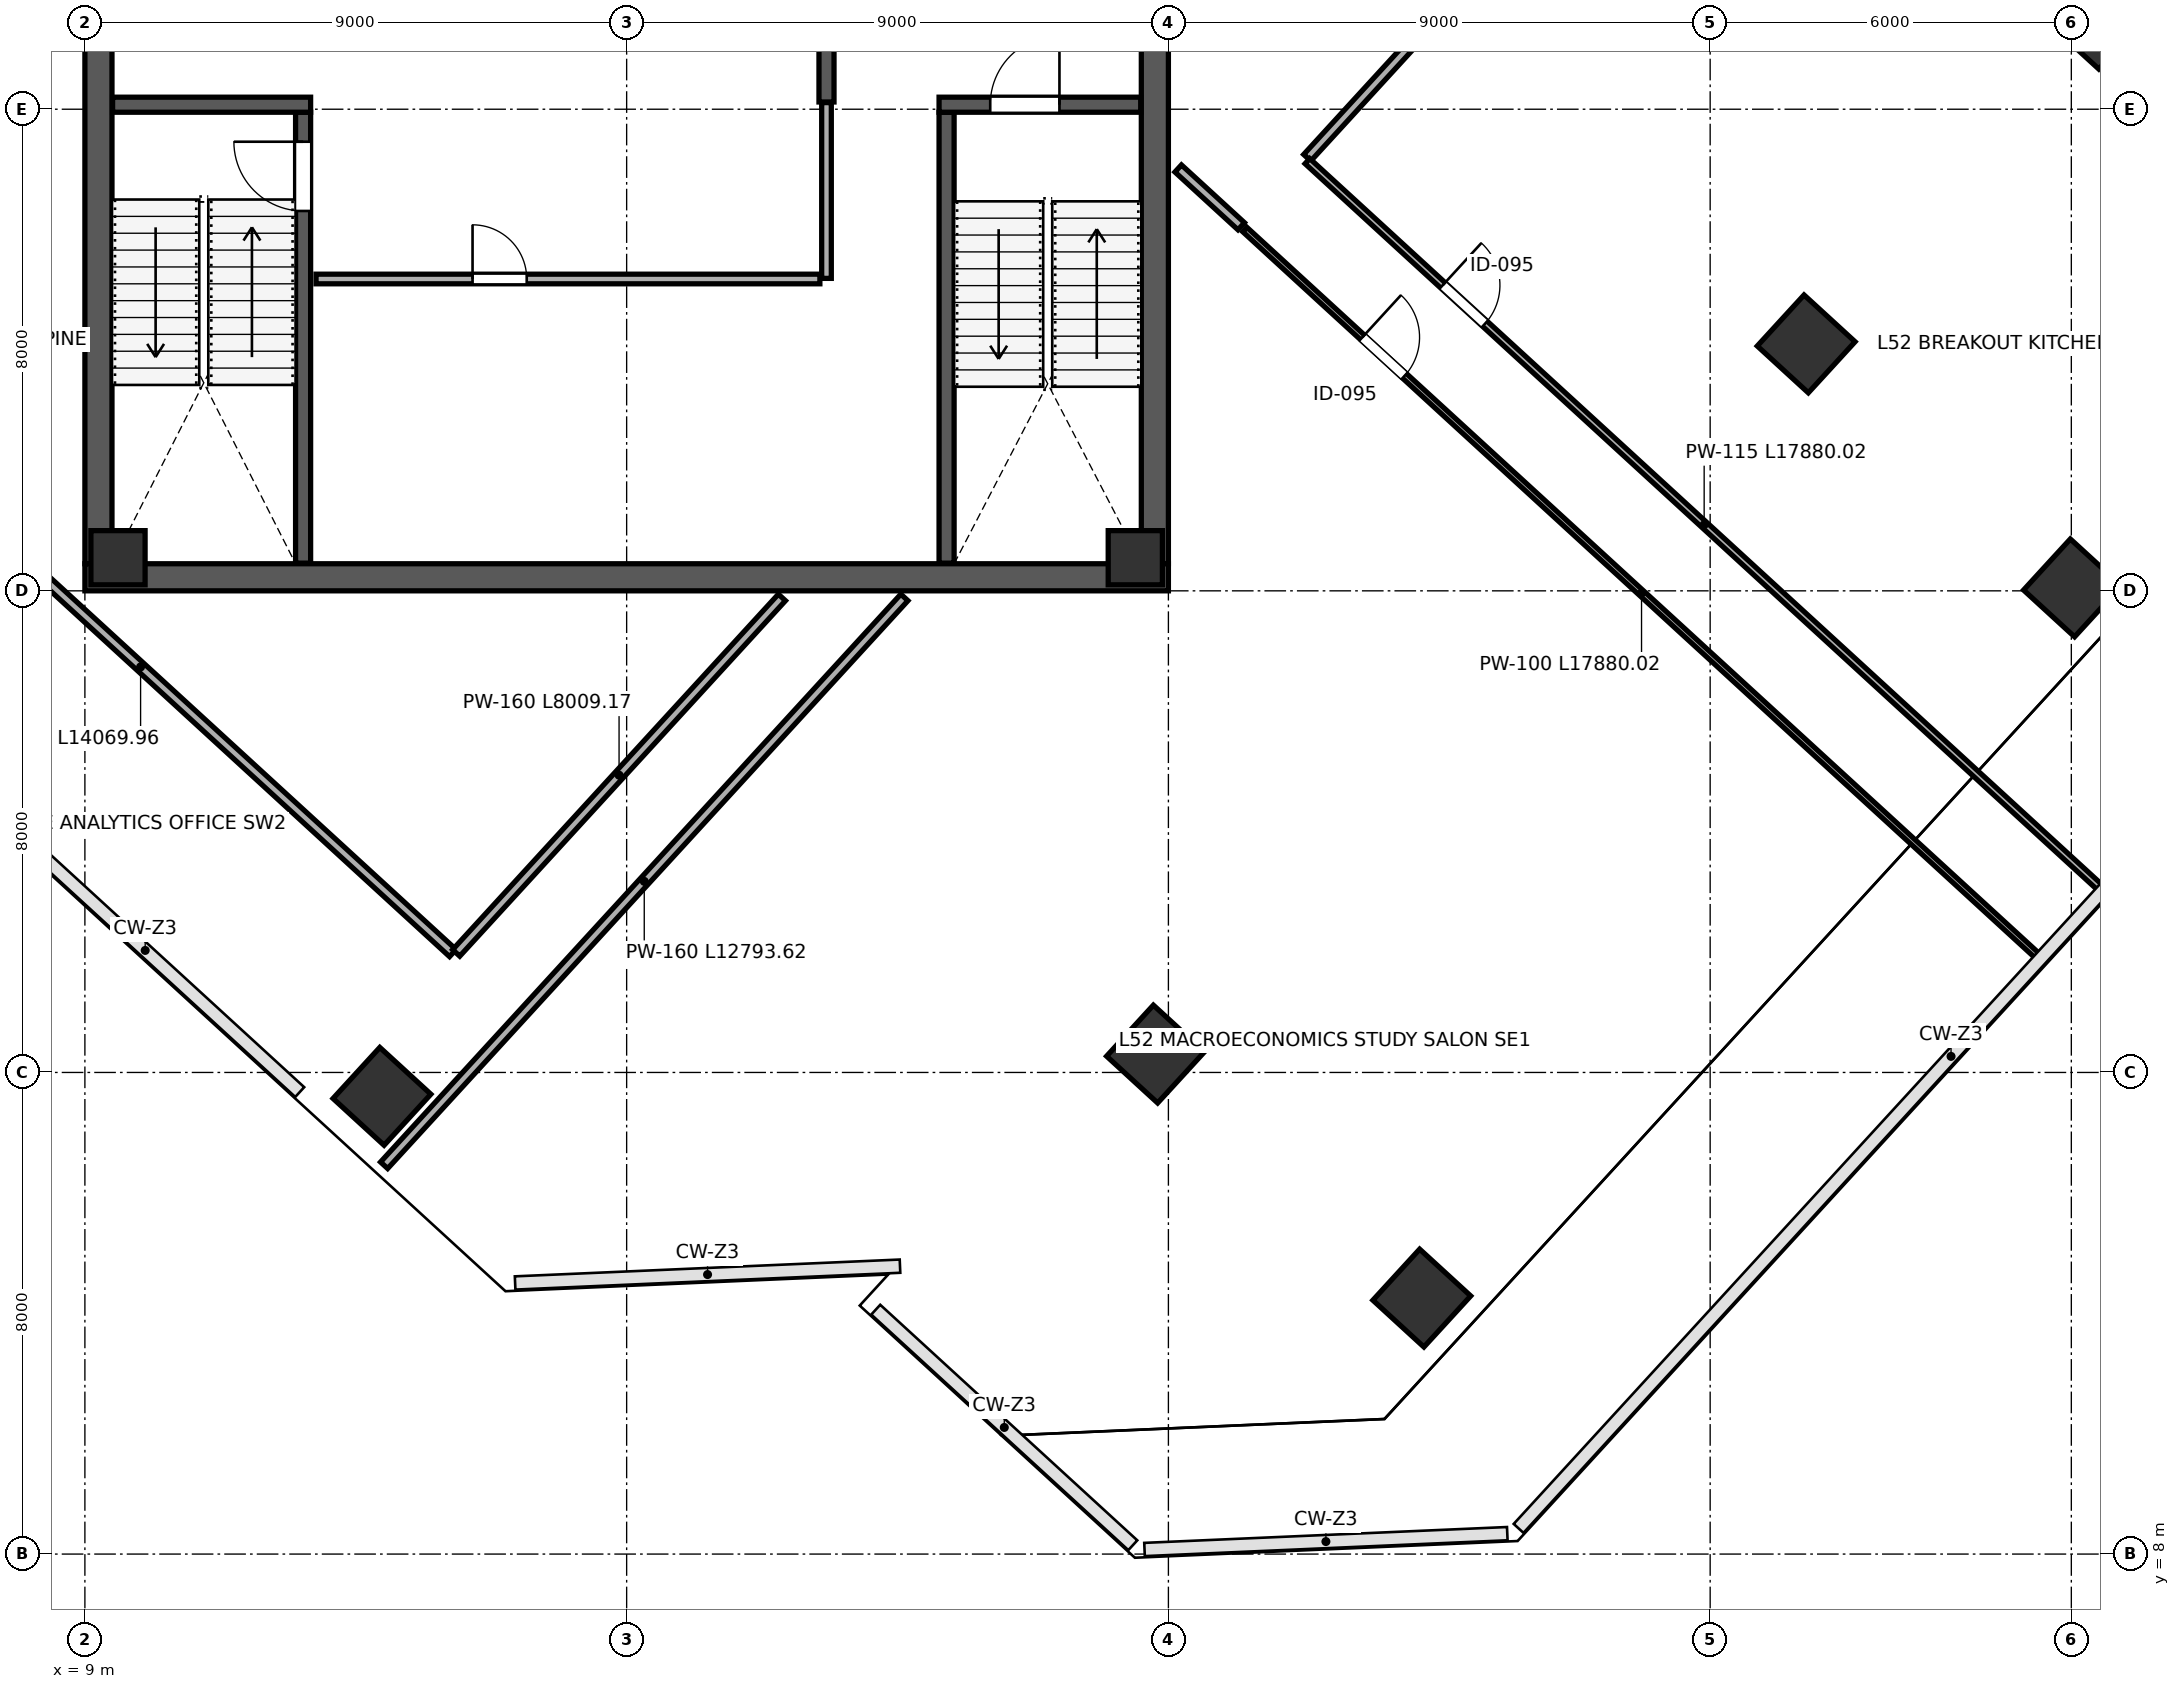
"""IFC4 building model, lengths in metres.
Left out: names, types, materials, properties, quantities, classifications, styles, units other than length and angle.
Written with IfcOpenShell. Run it as: python <this file> out.ifc"""

import sys

from ifc_helpers import new_model, si_unit, direction, frame, frame_2d, origin, origin_2d, place, context, subcontext, project, spatial, rectangle, extrude, source, transform, mapped, element, fill, save


model = new_model("IFC4")
c1 = context("Model", 3, precision=1e-05, world=origin(), true_north=direction((0.0, 1.0)))
c2 = subcontext(c1, "Body", "Model", "MODEL_VIEW")
j1 = project(units=[si_unit("LENGTHUNIT", "METRE"), si_unit("PLANEANGLEUNIT", "RADIAN")], contexts=[c1])
p1 = place(None, origin())
s1 = spatial("IfcSite", under=j1, at=p1, CompositionType="ELEMENT")
p2 = place(p1, origin())
s2 = spatial("IfcBuilding", under=s1, at=p2, CompositionType="ELEMENT")
p3 = place(p2, frame((0.0, 0.0, 233.2)))
s3 = spatial("IfcBuildingStorey", under=s2, at=p3, CompositionType="ELEMENT", Elevation=233.2)
m1 = source(origin(), c2, "Body", "SweptSolid", [
    extrude(rectangle(XDim=0.9, YDim=0.9, at=origin_2d()), origin(), (0.0, 0.0, 1.0), 4.198),
])
for number, where, z_axis, x_axis in (
    (1, (9.55, 24.55, 0.001), (0.0, 0.0, 1.0), (1.0, 0.0, 0.0)),
    (2, (26.45, 24.55, 0.001), (0.0, 0.0, 1.0), (1.0, 0.0, 0.0)),
):
    element("IfcColumn", number, at=place(p3, frame(where, z_axis=z_axis, x_axis=x_axis)), inside=s3, PredefinedType="COLUMN", context=c2, shape_type="MappedRepresentation", body=[
        mapped(m1, transform((0.0, 0.0, 0.0), scale=1.0)),
    ])
m2 = source(origin(), c2, "Body", "SweptSolid", [
    extrude(rectangle(XDim=1.15, YDim=1.15, at=origin_2d()), origin(), (0.0, 0.0, 1.0), 4.198),
])
p4 = place(p3, frame((13.935, 15.603, 0.001), z_axis=(0.0, 0.0, 1.0), x_axis=(-0.73727733681, 0.675590207616, 0.0)))
e3 = element("IfcColumn", 3, at=p4, inside=s3, PredefinedType="COLUMN", context=c2, shape_type="MappedRepresentation", body=[
    mapped(m2, transform((0.0, 0.0, 0.0), scale=1.0)),
])
m3 = source(origin(), c2, "Body", "SweptSolid", [
    extrude(rectangle(XDim=1.15, YDim=1.15, at=origin_2d()), origin(), (0.0, 0.0, 1.0), 4.198),
])
for number, where, z_axis, x_axis in (
    (4, (26.786, 16.306, 0.001), (0.0, 0.0, 1.0), (-0.737, 0.676, 0.0)),
    (5, (37.595, 28.102, 0.001), (0.0, 0.0, 1.0), (-0.737, 0.676, 0.0)),
):
    element("IfcColumn", number, at=place(p3, frame(where, z_axis=z_axis, x_axis=x_axis)), inside=s3, PredefinedType="COLUMN", context=c2, shape_type="MappedRepresentation", body=[
        mapped(m3, transform((0.0, 0.0, 0.0), scale=1.0)),
    ])
m4 = source(origin(), c2, "Body", "SweptSolid", [
    extrude(rectangle(XDim=1.0, YDim=1.0, at=origin_2d()), origin(), (0.0, 0.0, 1.0), 4.198),
])
p5 = place(p3, frame((42.426, 33.374, 0.001), z_axis=(0.0, 0.0, 1.0), x_axis=(-0.73727733681, 0.675590207616, 0.0)))
e6 = element("IfcColumn", 6, at=p5, inside=s3, PredefinedType="COLUMN", context=c2, shape_type="MappedRepresentation", body=[
    mapped(m4, transform((0.0, 0.0, 0.0), scale=1.0)),
])
for number, where, z_axis, x_axis in (
    (7, (31.209, 12.252, 0.001), (0.0, 0.0, 1.0), (-0.737, 0.676, 0.0)),
    (8, (42.019, 24.049, 0.001), (0.0, 0.0, 1.0), (-0.737, 0.676, 0.0)),
):
    element("IfcColumn", number, at=place(p3, frame(where, z_axis=z_axis, x_axis=x_axis)), inside=s3, PredefinedType="COLUMN", context=c2, shape_type="MappedRepresentation", body=[
        mapped(m2, transform((0.0, 0.0, 0.0), scale=1.0)),
    ])
p6 = place(p3, frame((9.225, 24.45, 0.0), z_axis=(0.0, 0.0, 1.0), x_axis=(0.0, 1.0, 0.0)))
e9 = element("IfcWall", 9, at=p6, inside=s3, PredefinedType="SHEAR", context=c2, shape_type="SweptSolid", body=[
    extrude(rectangle(XDim=15.1, YDim=0.45, at=frame_2d((7.55, 0.0))), origin(), (0.0, 0.0, 1.0), 3.96),
])
p7 = place(p6, frame((8.7, 0.0, 0.0)))
e10 = element("IfcOpeningElement", 10, at=p7, cuts=e9, PredefinedType="OPENING", context=c2, shape_type="SweptSolid", body=[
    extrude(rectangle(XDim=1.15, YDim=2.2, at=frame_2d((0.575, 1.1))), frame((0.0, 0.235, 0.0), z_axis=(0.0, -1.0, 0.0), x_axis=(1.0, 0.0, 0.0)), (0.0, 0.0, 1.0), 0.47),
])
p8 = place(p3, frame((26.775, 24.45, 0.0), z_axis=(0.0, 0.0, 1.0), x_axis=(0.0, 1.0, 0.0)))
e11 = element("IfcWall", 11, at=p8, inside=s3, PredefinedType="SHEAR", context=c2, shape_type="SweptSolid", body=[
    extrude(rectangle(XDim=15.1, YDim=0.45, at=frame_2d((7.55, 0.0))), origin(), (0.0, 0.0, 1.0), 3.96),
])
p9 = place(p8, frame((8.6, 0.0, 0.0)))
e12 = element("IfcOpeningElement", 12, at=p9, cuts=e11, PredefinedType="OPENING", context=c2, shape_type="SweptSolid", body=[
    extrude(rectangle(XDim=1.15, YDim=2.2, at=frame_2d((0.575, 1.1))), frame((0.0, 0.235, 0.0), z_axis=(0.0, -1.0, 0.0), x_axis=(1.0, 0.0, 0.0)), (0.0, 0.0, 1.0), 0.47),
])
p10 = place(p3, frame((9.0, 24.225, 0.0), z_axis=(0.0, 0.0, 1.0), x_axis=(1.0, 0.0, 0.0)))
e13 = element("IfcWall", 13, at=p10, inside=s3, PredefinedType="SHEAR", context=c2, shape_type="SweptSolid", body=[
    extrude(rectangle(XDim=18.0, YDim=0.45, at=frame_2d((9.0, 0.0))), origin(), (0.0, 0.0, 1.0), 3.96),
])
p11 = place(p3, frame((12.625, 24.46, 0.0), z_axis=(0.0, 0.0, 1.0), x_axis=(0.0, 1.0, 0.0)))
e14 = element("IfcWall", 14, at=p11, inside=s3, PredefinedType="SHEAR", context=c2, shape_type="SweptSolid", body=[
    extrude(rectangle(XDim=7.49, YDim=0.25, at=frame_2d((3.745, 0.0))), origin(), (0.0, 0.0, 1.0), 3.96),
])
p12 = place(p11, frame((5.85, 0.0, 0.0)))
e15 = element("IfcOpeningElement", 15, at=p12, cuts=e14, PredefinedType="OPENING", context=c2, shape_type="SweptSolid", body=[
    extrude(rectangle(XDim=1.15, YDim=2.2, at=frame_2d((0.575, 1.1))), frame((0.0, 0.135, 0.0), z_axis=(0.0, -1.0, 0.0), x_axis=(1.0, 0.0, 0.0)), (0.0, 0.0, 1.0), 0.27),
])
p13 = place(p3, frame((9.46, 32.075, 0.0), z_axis=(0.0, 0.0, 1.0), x_axis=(1.0, 0.0, 0.0)))
e16 = element("IfcWall", 16, at=p13, inside=s3, PredefinedType="SHEAR", context=c2, shape_type="SweptSolid", body=[
    extrude(rectangle(XDim=3.29, YDim=0.25, at=frame_2d((1.645, 0.0))), origin(), (0.0, 0.0, 1.0), 3.96),
])
p14 = place(p3, frame((23.315, 24.46, 0.0), z_axis=(0.0, 0.0, 1.0), x_axis=(0.0, 1.0, 0.0)))
e17 = element("IfcWall", 17, at=p14, inside=s3, PredefinedType="SHEAR", context=c2, shape_type="SweptSolid", body=[
    extrude(rectangle(XDim=7.49, YDim=0.25, at=frame_2d((3.745, 0.0))), origin(), (0.0, 0.0, 1.0), 3.96),
])
p15 = place(p3, frame((23.19, 32.075, 0.0), z_axis=(0.0, 0.0, 1.0), x_axis=(1.0, 0.0, 0.0)))
e18 = element("IfcWall", 18, at=p15, inside=s3, PredefinedType="SHEAR", context=c2, shape_type="SweptSolid", body=[
    extrude(rectangle(XDim=3.35, YDim=0.25, at=frame_2d((1.675, 0.0))), origin(), (0.0, 0.0, 1.0), 3.96),
])
p16 = place(p15, frame((0.85, 0.0, 0.0)))
e19 = element("IfcOpeningElement", 19, at=p16, cuts=e18, PredefinedType="OPENING", context=c2, shape_type="SweptSolid", body=[
    extrude(rectangle(XDim=1.15, YDim=2.2, at=frame_2d((0.575, 1.1))), frame((0.0, 0.135, 0.0), z_axis=(0.0, -1.0, 0.0), x_axis=(1.0, 0.0, 0.0)), (0.0, 0.0, 1.0), 0.27),
])
p17 = place(p3, frame((21.32, 32.12, 0.0), z_axis=(0.0, 0.0, 1.0), x_axis=(0.0, 1.0, 0.0)))
e20 = element("IfcWall", 20, at=p17, inside=s3, PredefinedType="SHEAR", context=c2, shape_type="SweptSolid", body=[
    extrude(rectangle(XDim=7.42, YDim=0.25, at=frame_2d((3.71, 0.0))), origin(), (0.0, 0.0, 1.0), 3.96),
])
p18 = place(p17, frame((1.4, 0.0, 0.0)))
e21 = element("IfcOpeningElement", 21, at=p18, cuts=e20, PredefinedType="OPENING", context=c2, shape_type="SweptSolid", body=[
    extrude(rectangle(XDim=1.15, YDim=2.2, at=frame_2d((0.575, 1.1))), frame((0.0, 0.135, 0.0), z_axis=(0.0, -1.0, 0.0), x_axis=(1.0, 0.0, 0.0)), (0.0, 0.0, 1.0), 0.27),
])
p19 = place(p3, frame((12.84, 29.18, 0.0), z_axis=(0.0, 0.0, 1.0), x_axis=(1.0, 0.0, 0.0)))
e22 = element("IfcWall", 22, at=p19, inside=s3, PredefinedType="PARTITIONING", context=c2, shape_type="SweptSolid", body=[
    extrude(rectangle(XDim=8.37, YDim=0.16, at=frame_2d((4.185, 0.0))), origin(), (0.0, 0.0, 1.0), 3.96),
])
p20 = place(p19, frame((2.6, 0.0, 0.0)))
e23 = element("IfcOpeningElement", 23, at=p20, cuts=e22, PredefinedType="OPENING", context=c2, shape_type="SweptSolid", body=[
    extrude(rectangle(XDim=0.9, YDim=2.15, at=frame_2d((0.45, 1.075))), frame((0.0, 0.09, 0.0), z_axis=(0.0, -1.0, 0.0), x_axis=(1.0, 0.0, 0.0)), (0.0, 0.0, 1.0), 0.18),
])
p21 = place(p3, frame((21.32, 29.19, 0.0), z_axis=(0.0, 0.0, 1.0), x_axis=(0.0, 1.0, 0.0)))
e24 = element("IfcWall", 24, at=p21, inside=s3, PredefinedType="PARTITIONING", context=c2, shape_type="SweptSolid", body=[
    extrude(rectangle(XDim=2.92, YDim=0.16, at=frame_2d((1.46, 0.0))), origin(), (0.0, 0.0, 1.0), 3.96),
])
p22 = place(p3, frame((4.739, 27.489, 0.0), z_axis=(0.0, 0.0, 1.0), x_axis=(0.737276572642, -0.675591041558, 0.0)))
e25 = element("IfcWall", 25, at=p22, inside=s3, PredefinedType="PARTITIONING", context=c2, shape_type="SweptSolid", body=[
    extrude(rectangle(XDim=14.07, YDim=0.16, at=frame_2d((7.035, 0.0))), origin(), (0.0, 0.0, 1.0), 3.96),
])
p23 = place(p22, frame((1.15, 0.0, 0.0)))
e26 = element("IfcOpeningElement", 26, at=p23, cuts=e25, PredefinedType="OPENING", context=c2, shape_type="SweptSolid", body=[
    extrude(rectangle(XDim=0.95, YDim=2.15, at=frame_2d((0.475, 1.075))), frame((0.0, 0.09, 0.0), z_axis=(0.0, -1.0, 0.0), x_axis=(1.0, 0.0, 0.0)), (0.0, 0.0, 1.0), 0.18),
])
p24 = place(p3, frame((15.168, 17.986, 0.0), z_axis=(0.0, 0.0, 1.0), x_axis=(0.675616954369, 0.737252827034, 0.0)))
e27 = element("IfcWall", 27, at=p24, inside=s3, PredefinedType="PARTITIONING", context=c2, shape_type="SweptSolid", body=[
    extrude(rectangle(XDim=8.009, YDim=0.16, at=frame_2d((4.005, 0.0))), origin(), (0.0, 0.0, 1.0), 3.96),
])
p25 = place(p3, frame((27.163, 31.016, 0.0), z_axis=(0.0, 0.0, 1.0), x_axis=(0.737296869908, -0.675568890361, 0.0)))
e28 = element("IfcWall", 28, at=p25, inside=s3, PredefinedType="PARTITIONING", context=c2, shape_type="SweptSolid", body=[
    extrude(rectangle(XDim=1.42, YDim=0.16, at=frame_2d((0.71, 0.0))), origin(), (0.0, 0.0, 1.0), 3.96),
])
p26 = place(p3, frame((1.73, 32.85, 0.0), z_axis=(0.0, 0.0, 1.0), x_axis=(0.675589845589, 0.737277668546, 0.0)))
e29 = element("IfcWall", 29, at=p26, inside=s3, PredefinedType="PARTITIONING", context=c2, shape_type="SweptSolid", body=[
    extrude(rectangle(XDim=26.742, YDim=0.115, at=frame_2d((13.371, 0.0))), origin(), (0.0, 0.0, 1.0), 3.96),
])
p27 = place(p3, frame((29.307, 31.194, 0.0), z_axis=(0.0, 0.0, 1.0), x_axis=(0.67558228032, 0.73728460076, 0.0)))
e30 = element("IfcWall", 30, at=p27, inside=s3, PredefinedType="PARTITIONING", context=c2, shape_type="SweptSolid", body=[
    extrude(rectangle(XDim=11.34, YDim=0.16, at=frame_2d((5.67, 0.0))), origin(), (0.0, 0.0, 1.0), 3.195),
])
p28 = place(p3, frame((13.971, 14.458, 0.0), z_axis=(0.0, 0.0, 1.0), x_axis=(0.675595861889, 0.737272155583, 0.0)))
e31 = element("IfcWall", 31, at=p28, inside=s3, PredefinedType="PARTITIONING", context=c2, shape_type="SweptSolid", body=[
    extrude(rectangle(XDim=12.794, YDim=0.16, at=frame_2d((6.397, 0.0))), origin(), (0.0, 0.0, 1.0), 3.96),
])
p29 = place(p3, frame((29.309, 31.138, 0.0), z_axis=(0.0, 0.0, 1.0), x_axis=(0.737278819957, -0.675588589041, 0.0)))
e32 = element("IfcWall", 32, at=p29, inside=s3, PredefinedType="PARTITIONING", context=c2, shape_type="SweptSolid", body=[
    extrude(rectangle(XDim=17.88, YDim=0.115, at=frame_2d((8.94, 0.0))), origin(), (0.0, 0.0, 1.0), 3.252),
])
p30 = place(p29, frame((3.05, 0.0, 0.0)))
e33 = element("IfcOpeningElement", 33, at=p30, cuts=e32, PredefinedType="OPENING", context=c2, shape_type="SweptSolid", body=[
    extrude(rectangle(XDim=0.95, YDim=2.15, at=frame_2d((0.475, 1.075))), frame((0.0, 0.067, 0.0), z_axis=(0.0, -1.0, 0.0), x_axis=(1.0, 0.0, 0.0)), (0.0, 0.0, 1.0), 0.135),
])
p31 = place(p3, frame((28.269, 30.002, 0.0), z_axis=(0.0, 0.0, 1.0), x_axis=(0.737272587758, -0.67559539026, 0.0)))
e34 = element("IfcWall", 34, at=p31, inside=s3, PredefinedType="PARTITIONING", context=c2, shape_type="SweptSolid", body=[
    extrude(rectangle(XDim=17.88, YDim=0.1, at=frame_2d((8.94, 0.0))), origin(), (0.0, 0.0, 1.0), 3.252),
])
p32 = place(p31, frame((2.65, 0.0, 0.0)))
e35 = element("IfcOpeningElement", 35, at=p32, cuts=e34, PredefinedType="OPENING", context=c2, shape_type="SweptSolid", body=[
    extrude(rectangle(XDim=0.95, YDim=2.15, at=frame_2d((0.475, 1.075))), frame((0.0, 0.06, 0.0), z_axis=(0.0, -1.0, 0.0), x_axis=(1.0, 0.0, 0.0)), (0.0, 0.0, 1.0), 0.12),
])
m5 = source(origin(), c2, "Body", "SweptSolid", [
    extrude(rectangle(XDim=1.15, YDim=2.2, at=frame_2d((0.575, 1.1))), frame((0.0, 0.025, 0.0), z_axis=(0.0, -1.0, 0.0), x_axis=(1.0, 0.0, 0.0)), (0.0, 0.0, 1.0), 0.05),
])
p33 = place(p12, origin())
e36 = element("IfcDoor", 36, at=p33, inside=s3, OperationType="SINGLE_SWING_RIGHT", PredefinedType="DOOR", context=c2, shape_type="MappedRepresentation", body=[
    mapped(m5, transform((0.0, 0.0, 0.0), scale=1.0)),
])
fill(e15, e36)
p34 = place(p16, origin())
e37 = element("IfcDoor", 37, at=p34, inside=s3, OperationType="SINGLE_SWING_RIGHT", PredefinedType="DOOR", context=c2, shape_type="MappedRepresentation", body=[
    mapped(m5, transform((0.0, 0.0, 0.0), scale=1.0)),
])
fill(e19, e37)
m6 = source(origin(), c2, "Body", "SweptSolid", [
    extrude(rectangle(XDim=0.9, YDim=2.15, at=frame_2d((0.45, 1.075))), frame((0.0, 0.025, 0.0), z_axis=(0.0, -1.0, 0.0), x_axis=(1.0, 0.0, 0.0)), (0.0, 0.0, 1.0), 0.05),
])
p35 = place(p20, origin())
e38 = element("IfcDoor", 38, at=p35, inside=s3, OperationType="SINGLE_SWING_LEFT", PredefinedType="DOOR", context=c2, shape_type="MappedRepresentation", body=[
    mapped(m6, transform((0.0, 0.0, 0.0), scale=1.0)),
])
fill(e23, e38)
m7 = source(origin(), c2, "Body", "SweptSolid", [
    extrude(rectangle(XDim=0.95, YDim=2.15, at=frame_2d((0.475, 1.075))), frame((0.0, 0.025, 0.0), z_axis=(0.0, -1.0, 0.0), x_axis=(1.0, 0.0, 0.0)), (0.0, 0.0, 1.0), 0.05),
])
p36 = place(p30, origin())
e39 = element("IfcDoor", 39, at=p36, inside=s3, OperationType="SINGLE_SWING_LEFT", PredefinedType="DOOR", context=c2, shape_type="MappedRepresentation", body=[
    mapped(m7, transform((0.0, 0.0, 0.0), scale=1.0)),
])
fill(e33, e39)
p37 = place(p32, origin())
e40 = element("IfcDoor", 40, at=p37, inside=s3, OperationType="SINGLE_SWING_LEFT", PredefinedType="DOOR", context=c2, shape_type="MappedRepresentation", body=[
    mapped(m7, transform((0.0, 0.0, 0.0), scale=1.0)),
])
fill(e35, e40)
save(model, sys.argv[1])
